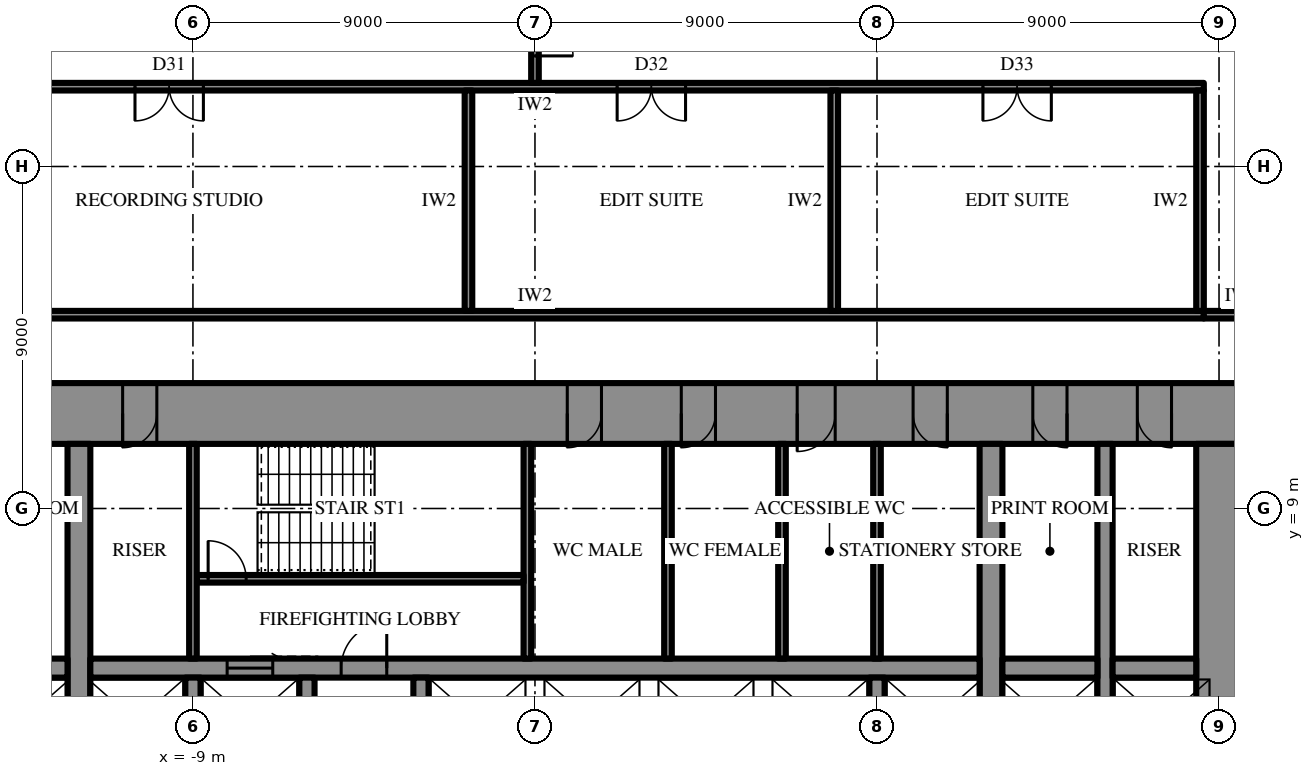
"""IFC4 building model, lengths in metres.
Left out: names, types, materials, properties, quantities, classifications, styles, units other than length and angle.
Written with IfcOpenShell. Run it as: python <this file> out.ifc"""

import sys

from ifc_helpers import new_model, si_unit, direction, frame, frame_2d, origin, place, context, subcontext, project, spatial, rectangle, extrude, element, fill, save


model = new_model("IFC4")
c1 = context("Model", 3, precision=1e-05, world=origin(), true_north=direction((0.0, 1.0)))
c2 = subcontext(c1, "Body", "Model", "MODEL_VIEW")
j1 = project(units=[si_unit("LENGTHUNIT", "METRE"), si_unit("PLANEANGLEUNIT", "RADIAN")], contexts=[c1])
p1 = place(None, origin())
s1 = spatial("IfcSite", under=j1, at=p1, CompositionType="ELEMENT")
p2 = place(p1, origin())
s2 = spatial("IfcBuilding", under=s1, at=p2, CompositionType="ELEMENT")
p3 = place(p2, frame((0.0, 0.0, 99.1)))
s3 = spatial("IfcBuildingStorey", under=s2, at=p3, CompositionType="ELEMENT", Elevation=99.1)
p4 = place(p3, frame((-18.6, 11.5, 0.0), z_axis=(0.0, 0.0, 1.0), x_axis=(1.0, 0.0, 0.0)))
e1 = element("IfcWall", 1, at=p4, inside=s3, PredefinedType="SHEAR", context=c2, shape_type="SweptSolid", body=[
    extrude(rectangle(XDim=37.2, YDim=1.6, at=frame_2d((18.6, 0.0))), origin(), (0.0, 0.0, 1.0), 4.2),
])
p5 = place(p4, frame((19.45, 0.0, 0.0)))
e2 = element("IfcOpeningElement", 2, at=p5, cuts=e1, PredefinedType="OPENING", context=c2, shape_type="SweptSolid", body=[
    extrude(rectangle(XDim=0.9, YDim=2.2, at=frame_2d((0.45, 1.1))), frame((0.0, 0.81, 0.0), z_axis=(0.0, -1.0, 0.0), x_axis=(1.0, 0.0, 0.0)), (0.0, 0.0, 1.0), 1.62),
])
p6 = place(p4, frame((22.45, 0.0, 0.0)))
e3 = element("IfcOpeningElement", 3, at=p6, cuts=e1, PredefinedType="OPENING", context=c2, shape_type="SweptSolid", body=[
    extrude(rectangle(XDim=0.9, YDim=2.2, at=frame_2d((0.45, 1.1))), frame((0.0, 0.81, 0.0), z_axis=(0.0, -1.0, 0.0), x_axis=(1.0, 0.0, 0.0)), (0.0, 0.0, 1.0), 1.62),
])
p7 = place(p4, frame((25.5, 0.0, 0.0)))
e4 = element("IfcOpeningElement", 4, at=p7, cuts=e1, PredefinedType="OPENING", context=c2, shape_type="SweptSolid", body=[
    extrude(rectangle(XDim=1.0, YDim=2.2, at=frame_2d((0.5, 1.1))), frame((0.0, 0.81, 0.0), z_axis=(0.0, -1.0, 0.0), x_axis=(1.0, 0.0, 0.0)), (0.0, 0.0, 1.0), 1.62),
])
p8 = place(p4, frame((1.85, 0.0, 0.0)))
e5 = element("IfcOpeningElement", 5, at=p8, cuts=e1, PredefinedType="OPENING", context=c2, shape_type="SweptSolid", body=[
    extrude(rectangle(XDim=0.9, YDim=2.2, at=frame_2d((0.45, 1.1))), frame((0.0, 0.81, 0.0), z_axis=(0.0, -1.0, 0.0), x_axis=(1.0, 0.0, 0.0)), (0.0, 0.0, 1.0), 1.62),
])
p9 = place(p4, frame((4.6, 0.0, 0.0)))
e6 = element("IfcOpeningElement", 6, at=p9, cuts=e1, PredefinedType="OPENING", context=c2, shape_type="SweptSolid", body=[
    extrude(rectangle(XDim=0.9, YDim=2.2, at=frame_2d((0.45, 1.1))), frame((0.0, 0.81, 0.0), z_axis=(0.0, -1.0, 0.0), x_axis=(1.0, 0.0, 0.0)), (0.0, 0.0, 1.0), 1.62),
])
p10 = place(p4, frame((7.75, 0.0, 0.0)))
e7 = element("IfcOpeningElement", 7, at=p10, cuts=e1, PredefinedType="OPENING", context=c2, shape_type="SweptSolid", body=[
    extrude(rectangle(XDim=0.9, YDim=2.2, at=frame_2d((0.45, 1.1))), frame((0.0, 0.81, 0.0), z_axis=(0.0, -1.0, 0.0), x_axis=(1.0, 0.0, 0.0)), (0.0, 0.0, 1.0), 1.62),
])
p11 = place(p4, frame((28.55, 0.0, 0.0)))
e8 = element("IfcOpeningElement", 8, at=p11, cuts=e1, PredefinedType="OPENING", context=c2, shape_type="SweptSolid", body=[
    extrude(rectangle(XDim=0.9, YDim=2.2, at=frame_2d((0.45, 1.1))), frame((0.0, 0.81, 0.0), z_axis=(0.0, -1.0, 0.0), x_axis=(1.0, 0.0, 0.0)), (0.0, 0.0, 1.0), 1.62),
])
p12 = place(p4, frame((31.7, 0.0, 0.0)))
e9 = element("IfcOpeningElement", 9, at=p12, cuts=e1, PredefinedType="OPENING", context=c2, shape_type="SweptSolid", body=[
    extrude(rectangle(XDim=0.9, YDim=2.2, at=frame_2d((0.45, 1.1))), frame((0.0, 0.81, 0.0), z_axis=(0.0, -1.0, 0.0), x_axis=(1.0, 0.0, 0.0)), (0.0, 0.0, 1.0), 1.62),
])
p13 = place(p4, frame((34.45, 0.0, 0.0)))
e10 = element("IfcOpeningElement", 10, at=p13, cuts=e1, PredefinedType="OPENING", context=c2, shape_type="SweptSolid", body=[
    extrude(rectangle(XDim=0.9, YDim=2.2, at=frame_2d((0.45, 1.1))), frame((0.0, 0.81, 0.0), z_axis=(0.0, -1.0, 0.0), x_axis=(1.0, 0.0, 0.0)), (0.0, 0.0, 1.0), 1.62),
])
p14 = place(p3, frame((18.0, -10.7, 0.0), z_axis=(0.0, 0.0, 1.0), x_axis=(0.0, 1.0, 0.0)))
e11 = element("IfcWall", 11, at=p14, inside=s3, PredefinedType="SHEAR", context=c2, shape_type="SweptSolid", body=[
    extrude(rectangle(XDim=21.4, YDim=1.2, at=frame_2d((10.7, 0.0))), origin(), (0.0, 0.0, 1.0), 4.2),
])
p15 = place(p14, frame((9.8, 0.0, 0.0)))
e12 = element("IfcOpeningElement", 12, at=p15, cuts=e11, PredefinedType="OPENING", context=c2, shape_type="SweptSolid", body=[
    extrude(rectangle(XDim=1.8, YDim=2.4, at=frame_2d((0.9, 1.2))), frame((0.0, 0.61, 0.0), z_axis=(0.0, -1.0, 0.0), x_axis=(1.0, 0.0, 0.0)), (0.0, 0.0, 1.0), 1.22),
])
p16 = place(p3, frame((12.0, -10.7, 0.0), z_axis=(0.0, 0.0, 1.0), x_axis=(0.0, 1.0, 0.0)))
e13 = element("IfcWall", 13, at=p16, inside=s3, PredefinedType="SHEAR", context=c2, shape_type="SweptSolid", body=[
    extrude(rectangle(XDim=21.4, YDim=0.6, at=frame_2d((10.7, 0.0))), origin(), (0.0, 0.0, 1.0), 4.2),
])
p17 = place(p16, frame((9.8, 0.0, 0.0)))
e14 = element("IfcOpeningElement", 14, at=p17, cuts=e13, PredefinedType="OPENING", context=c2, shape_type="SweptSolid", body=[
    extrude(rectangle(XDim=1.8, YDim=2.4, at=frame_2d((0.9, 1.2))), frame((0.0, 0.31, 0.0), z_axis=(0.0, -1.0, 0.0), x_axis=(1.0, 0.0, 0.0)), (0.0, 0.0, 1.0), 0.62),
])
p18 = place(p3, frame((-12.0, -10.7, 0.0), z_axis=(0.0, 0.0, 1.0), x_axis=(0.0, 1.0, 0.0)))
e15 = element("IfcWall", 15, at=p18, inside=s3, PredefinedType="SHEAR", context=c2, shape_type="SweptSolid", body=[
    extrude(rectangle(XDim=21.4, YDim=0.6, at=frame_2d((10.7, 0.0))), origin(), (0.0, 0.0, 1.0), 4.2),
])
p19 = place(p18, frame((9.8, 0.0, 0.0)))
e16 = element("IfcOpeningElement", 16, at=p19, cuts=e15, PredefinedType="OPENING", context=c2, shape_type="SweptSolid", body=[
    extrude(rectangle(XDim=1.8, YDim=2.4, at=frame_2d((0.9, 1.2))), frame((0.0, 0.31, 0.0), z_axis=(0.0, -1.0, 0.0), x_axis=(1.0, 0.0, 0.0)), (0.0, 0.0, 1.0), 0.62),
])
p20 = place(p3, frame((15.0, -10.7, 0.0), z_axis=(0.0, 0.0, 1.0), x_axis=(0.0, 1.0, 0.0)))
e17 = element("IfcWall", 17, at=p20, inside=s3, PredefinedType="SHEAR", context=c2, shape_type="SweptSolid", body=[
    extrude(rectangle(XDim=21.4, YDim=0.4, at=frame_2d((10.7, 0.0))), origin(), (0.0, 0.0, 1.0), 4.2),
])
p21 = place(p20, frame((9.8, 0.0, 0.0)))
e18 = element("IfcOpeningElement", 18, at=p21, cuts=e17, PredefinedType="OPENING", context=c2, shape_type="SweptSolid", body=[
    extrude(rectangle(XDim=1.8, YDim=2.4, at=frame_2d((0.9, 1.2))), frame((0.0, 0.21, 0.0), z_axis=(0.0, -1.0, 0.0), x_axis=(1.0, 0.0, 0.0)), (0.0, 0.0, 1.0), 0.42),
])
p22 = place(p3, frame((-14.8, 4.8, 0.0), z_axis=(0.0, 0.0, 1.0), x_axis=(1.0, 0.0, 0.0)))
e19 = element("IfcWall", 19, at=p22, inside=s3, PredefinedType="SHEAR", context=c2, shape_type="SweptSolid", body=[
    extrude(rectangle(XDim=2.5, YDim=0.5, at=frame_2d((1.25, 0.0))), origin(), (0.0, 0.0, 1.0), 4.2),
])
p23 = place(p3, frame((-11.7, 4.8, 0.0), z_axis=(0.0, 0.0, 1.0), x_axis=(1.0, 0.0, 0.0)))
e20 = element("IfcWall", 20, at=p23, inside=s3, PredefinedType="SHEAR", context=c2, shape_type="SweptSolid", body=[
    extrude(rectangle(XDim=23.4, YDim=0.5, at=frame_2d((11.7, 0.0))), origin(), (0.0, 0.0, 1.0), 4.2),
])
p24 = place(p23, frame((6.6, 0.0, 0.0)))
e21 = element("IfcOpeningElement", 21, at=p24, cuts=e20, PredefinedType="OPENING", context=c2, shape_type="SweptSolid", body=[
    extrude(rectangle(XDim=1.2, YDim=2.2, at=frame_2d((0.6, 1.1))), frame((0.0, 0.26, 0.0), z_axis=(0.0, -1.0, 0.0), x_axis=(1.0, 0.0, 0.0)), (0.0, 0.0, 1.0), 0.52),
])
p25 = place(p23, frame((3.6, 0.0, 0.0)))
e22 = element("IfcOpeningElement", 22, at=p25, cuts=e20, PredefinedType="OPENING", context=c2, shape_type="SweptSolid", body=[
    extrude(rectangle(XDim=1.2, YDim=2.2, at=frame_2d((0.6, 1.1))), frame((0.0, 0.26, 0.0), z_axis=(0.0, -1.0, 0.0), x_axis=(1.0, 0.0, 0.0)), (0.0, 0.0, 1.0), 0.52),
])
p26 = place(p3, frame((12.3, 4.8, 0.0), z_axis=(0.0, 0.0, 1.0), x_axis=(1.0, 0.0, 0.0)))
e23 = element("IfcWall", 23, at=p26, inside=s3, PredefinedType="SHEAR", context=c2, shape_type="SweptSolid", body=[
    extrude(rectangle(XDim=2.5, YDim=0.5, at=frame_2d((1.25, 0.0))), origin(), (0.0, 0.0, 1.0), 4.2),
])
p27 = place(p3, frame((15.2, 4.8, 0.0), z_axis=(0.0, 0.0, 1.0), x_axis=(1.0, 0.0, 0.0)))
e24 = element("IfcWall", 24, at=p27, inside=s3, PredefinedType="SHEAR", context=c2, shape_type="SweptSolid", body=[
    extrude(rectangle(XDim=2.2, YDim=0.5, at=frame_2d((1.1, 0.0))), origin(), (0.0, 0.0, 1.0), 4.2),
])
for number, where, z_axis, x_axis in (
    (25, (-9.0, 2.25, 0.0), (0.0, 0.0, 1.0), (0.0, 1.0, 0.0)),
    (26, (-6.0, 2.25, 0.0), (0.0, 0.0, 1.0), (0.0, 1.0, 0.0)),
    (27, (-3.0, 2.25, 0.0), (0.0, 0.0, 1.0), (0.0, 1.0, 0.0)),
    (28, (9.0, 2.25, 0.0), (0.0, 0.0, 1.0), (0.0, 1.0, 0.0)),
):
    element("IfcWall", number, at=place(p3, frame(where, z_axis=z_axis, x_axis=x_axis)), inside=s3, PredefinedType="SHEAR", context=c2, shape_type="SweptSolid", body=[
        extrude(rectangle(XDim=2.3, YDim=0.4, at=frame_2d((1.15, 0.0))), origin(), (0.0, 0.0, 1.0), 4.2),
    ])
p28 = place(p3, frame((-0.2, 5.05, 0.0), z_axis=(0.0, 0.0, 1.0), x_axis=(0.0, 1.0, 0.0)))
e29 = element("IfcWall", 29, at=p28, inside=s3, PredefinedType="SHEAR", context=c2, shape_type="SweptSolid", body=[
    extrude(rectangle(XDim=5.65, YDim=0.2, at=frame_2d((2.825, 0.0))), origin(), (0.0, 0.0, 1.0), 4.2),
])
p29 = place(p3, frame((-8.9, 7.15, 0.0), z_axis=(0.0, 0.0, 1.0), x_axis=(1.0, 0.0, 0.0)))
e30 = element("IfcWall", 30, at=p29, inside=s3, PredefinedType="SHEAR", context=c2, shape_type="SweptSolid", body=[
    extrude(rectangle(XDim=8.6, YDim=0.2, at=frame_2d((4.3, 0.0))), origin(), (0.0, 0.0, 1.0), 4.2),
])
p30 = place(p29, frame((0.3, 0.0, 0.0)))
e31 = element("IfcOpeningElement", 31, at=p30, cuts=e30, PredefinedType="OPENING", context=c2, shape_type="SweptSolid", body=[
    extrude(rectangle(XDim=1.0, YDim=2.2, at=frame_2d((0.5, 1.1))), frame((0.0, 0.11, 0.0), z_axis=(0.0, -1.0, 0.0), x_axis=(1.0, 0.0, 0.0)), (0.0, 0.0, 1.0), 0.22),
])
for number, where, z_axis, x_axis in (
    (32, (-9.0, 5.05, 0.0), (0.0, 0.0, 1.0), (0.0, 1.0, 0.0)),
    (33, (9.0, 5.05, 0.0), (0.0, 0.0, 1.0), (0.0, 1.0, 0.0)),
    (34, (3.5, 5.05, 0.0), (0.0, 0.0, 1.0), (0.0, 1.0, 0.0)),
    (35, (6.5, 5.05, 0.0), (0.0, 0.0, 1.0), (0.0, 1.0, 0.0)),
):
    element("IfcWall", number, at=place(p3, frame(where, z_axis=z_axis, x_axis=x_axis)), inside=s3, PredefinedType="PARTITIONING", context=c2, shape_type="SweptSolid", body=[
        extrude(rectangle(XDim=5.65, YDim=0.2, at=frame_2d((2.825, 0.0))), origin(), (0.0, 0.0, 1.0), 4.0),
    ])
p31 = place(p3, frame((-17.6, 14.1, 0.0), z_axis=(0.0, 0.0, 1.0), x_axis=(1.0, 0.0, 0.0)))
e36 = element("IfcWall", 36, at=p31, inside=s3, PredefinedType="PARTITIONING", context=c2, shape_type="SweptSolid", body=[
    extrude(rectangle(XDim=35.2, YDim=0.2, at=frame_2d((17.6, 0.0))), origin(), (0.0, 0.0, 1.0), 4.0),
])
p32 = place(p3, frame((-17.6, 20.1, 0.0), z_axis=(0.0, 0.0, 1.0), x_axis=(1.0, 0.0, 0.0)))
e37 = element("IfcWall", 37, at=p32, inside=s3, PredefinedType="PARTITIONING", context=c2, shape_type="SweptSolid", body=[
    extrude(rectangle(XDim=35.2, YDim=0.2, at=frame_2d((17.6, 0.0))), origin(), (0.0, 0.0, 1.0), 4.0),
])
p33 = place(p32, frame((7.075, 0.0, 0.0)))
e38 = element("IfcOpeningElement", 38, at=p33, cuts=e37, PredefinedType="OPENING", context=c2, shape_type="SweptSolid", body=[
    extrude(rectangle(XDim=1.8, YDim=2.4, at=frame_2d((0.9, 1.2))), frame((0.0, 0.11, 0.0), z_axis=(0.0, -1.0, 0.0), x_axis=(1.0, 0.0, 0.0)), (0.0, 0.0, 1.0), 0.22),
])
p34 = place(p32, frame((19.762, 0.0, 0.0)))
e39 = element("IfcOpeningElement", 39, at=p34, cuts=e37, PredefinedType="OPENING", context=c2, shape_type="SweptSolid", body=[
    extrude(rectangle(XDim=1.8, YDim=2.4, at=frame_2d((0.9, 1.2))), frame((0.0, 0.11, 0.0), z_axis=(0.0, -1.0, 0.0), x_axis=(1.0, 0.0, 0.0)), (0.0, 0.0, 1.0), 0.22),
])
p35 = place(p32, frame((29.387, 0.0, 0.0)))
e40 = element("IfcOpeningElement", 40, at=p35, cuts=e37, PredefinedType="OPENING", context=c2, shape_type="SweptSolid", body=[
    extrude(rectangle(XDim=1.8, YDim=2.4, at=frame_2d((0.9, 1.2))), frame((0.0, 0.11, 0.0), z_axis=(0.0, -1.0, 0.0), x_axis=(1.0, 0.0, 0.0)), (0.0, 0.0, 1.0), 0.22),
])
for number, where, z_axis, x_axis in (
    (41, (-1.75, 14.2, 0.0), (0.0, 0.0, 1.0), (0.0, 1.0, 0.0)),
    (42, (7.875, 14.2, 0.0), (0.0, 0.0, 1.0), (0.0, 1.0, 0.0)),
    (43, (17.5, 14.2, 0.0), (0.0, 0.0, 1.0), (0.0, 1.0, 0.0)),
):
    element("IfcWall", number, at=place(p3, frame(where, z_axis=z_axis, x_axis=x_axis)), inside=s3, PredefinedType="PARTITIONING", context=c2, shape_type="SweptSolid", body=[
        extrude(rectangle(XDim=5.8, YDim=0.2, at=frame_2d((2.9, 0.0))), origin(), (0.0, 0.0, 1.0), 4.0),
    ])
p36 = place(p3, frame((17.6, 14.1, 0.0), z_axis=(0.0, 0.0, 1.0), x_axis=(1.0, 0.0, 0.0)))
e44 = element("IfcWall", 44, at=p36, inside=s3, PredefinedType="PARTITIONING", context=c2, shape_type="SweptSolid", body=[
    extrude(rectangle(XDim=2.0, YDim=0.2, at=frame_2d((1.0, 0.0))), origin(), (0.0, 0.0, 1.0), 4.0),
])
p37 = place(p3, frame((0.0, 20.2, 0.0), z_axis=(0.0, 0.0, 1.0), x_axis=(0.0, 1.0, 0.0)))
e45 = element("IfcWall", 45, at=p37, inside=s3, PredefinedType="PARTITIONING", context=c2, shape_type="SweptSolid", body=[
    extrude(rectangle(XDim=12.1, YDim=0.2, at=frame_2d((6.05, 0.0))), origin(), (0.0, 0.0, 1.0), 2.944),
])
p38 = place(p37, frame((0.71, 0.0, 0.0)))
e46 = element("IfcOpeningElement", 46, at=p38, cuts=e45, PredefinedType="OPENING", context=c2, shape_type="SweptSolid", body=[
    extrude(rectangle(XDim=1.0, YDim=2.2, at=frame_2d((0.5, 1.1))), frame((0.0, 0.11, 0.0), z_axis=(0.0, -1.0, 0.0), x_axis=(1.0, 0.0, 0.0)), (0.0, 0.0, 1.0), 0.22),
])
p39 = place(p24, origin())
e47 = element("IfcDoor", 47, at=p39, inside=s3, OperationType="SINGLE_SWING_LEFT", PredefinedType="DOOR", context=c2, shape_type="SweptSolid", body=[
    extrude(rectangle(XDim=1.2, YDim=2.2, at=frame_2d((0.6, 1.1))), frame((0.0, 0.025, 0.0), z_axis=(0.0, -1.0, 0.0), x_axis=(1.0, 0.0, 0.0)), (0.0, 0.0, 1.0), 0.05),
])
fill(e21, e47)
p40 = place(p30, origin())
e48 = element("IfcDoor", 48, at=p40, inside=s3, OperationType="SINGLE_SWING_RIGHT", PredefinedType="DOOR", context=c2, shape_type="SweptSolid", body=[
    extrude(rectangle(XDim=1.0, YDim=2.2, at=frame_2d((0.5, 1.1))), frame((0.0, 0.025, 0.0), z_axis=(0.0, -1.0, 0.0), x_axis=(1.0, 0.0, 0.0)), (0.0, 0.0, 1.0), 0.05),
])
fill(e31, e48)
p41 = place(p5, frame((0.9, 0.0, 0.0), z_axis=(0.0, 0.0, 1.0), x_axis=(-1.0, 0.0, 0.0)))
e49 = element("IfcDoor", 49, at=p41, inside=s3, OperationType="SINGLE_SWING_LEFT", PredefinedType="DOOR", context=c2, shape_type="SweptSolid", body=[
    extrude(rectangle(XDim=0.9, YDim=2.2, at=frame_2d((0.45, 1.1))), frame((0.0, 0.025, 0.0), z_axis=(0.0, -1.0, 0.0), x_axis=(1.0, 0.0, 0.0)), (0.0, 0.0, 1.0), 0.05),
])
fill(e2, e49)
p42 = place(p6, frame((0.9, 0.0, 0.0), z_axis=(0.0, 0.0, 1.0), x_axis=(-1.0, 0.0, 0.0)))
e50 = element("IfcDoor", 50, at=p42, inside=s3, OperationType="SINGLE_SWING_LEFT", PredefinedType="DOOR", context=c2, shape_type="SweptSolid", body=[
    extrude(rectangle(XDim=0.9, YDim=2.2, at=frame_2d((0.45, 1.1))), frame((0.0, 0.025, 0.0), z_axis=(0.0, -1.0, 0.0), x_axis=(1.0, 0.0, 0.0)), (0.0, 0.0, 1.0), 0.05),
])
fill(e3, e50)
p43 = place(p7, frame((1.0, 0.0, 0.0), z_axis=(0.0, 0.0, 1.0), x_axis=(-1.0, 0.0, 0.0)))
e51 = element("IfcDoor", 51, at=p43, inside=s3, OperationType="SINGLE_SWING_LEFT", PredefinedType="DOOR", context=c2, shape_type="SweptSolid", body=[
    extrude(rectangle(XDim=1.0, YDim=2.2, at=frame_2d((0.5, 1.1))), frame((0.0, 0.025, 0.0), z_axis=(0.0, -1.0, 0.0), x_axis=(1.0, 0.0, 0.0)), (0.0, 0.0, 1.0), 0.05),
])
fill(e4, e51)
p44 = place(p10, frame((0.9, 0.0, 0.0), z_axis=(0.0, 0.0, 1.0), x_axis=(-1.0, 0.0, 0.0)))
e52 = element("IfcDoor", 52, at=p44, inside=s3, OperationType="SINGLE_SWING_LEFT", PredefinedType="DOOR", context=c2, shape_type="SweptSolid", body=[
    extrude(rectangle(XDim=0.9, YDim=2.2, at=frame_2d((0.45, 1.1))), frame((0.0, 0.025, 0.0), z_axis=(0.0, -1.0, 0.0), x_axis=(1.0, 0.0, 0.0)), (0.0, 0.0, 1.0), 0.05),
])
fill(e7, e52)
p45 = place(p11, frame((0.9, 0.0, 0.0), z_axis=(0.0, 0.0, 1.0), x_axis=(-1.0, 0.0, 0.0)))
e53 = element("IfcDoor", 53, at=p45, inside=s3, OperationType="SINGLE_SWING_RIGHT", PredefinedType="DOOR", context=c2, shape_type="SweptSolid", body=[
    extrude(rectangle(XDim=0.9, YDim=2.2, at=frame_2d((0.45, 1.1))), frame((0.0, 0.025, 0.0), z_axis=(0.0, -1.0, 0.0), x_axis=(1.0, 0.0, 0.0)), (0.0, 0.0, 1.0), 0.05),
])
fill(e8, e53)
p46 = place(p12, frame((0.9, 0.0, 0.0), z_axis=(0.0, 0.0, 1.0), x_axis=(-1.0, 0.0, 0.0)))
e54 = element("IfcDoor", 54, at=p46, inside=s3, OperationType="SINGLE_SWING_RIGHT", PredefinedType="DOOR", context=c2, shape_type="SweptSolid", body=[
    extrude(rectangle(XDim=0.9, YDim=2.2, at=frame_2d((0.45, 1.1))), frame((0.0, 0.025, 0.0), z_axis=(0.0, -1.0, 0.0), x_axis=(1.0, 0.0, 0.0)), (0.0, 0.0, 1.0), 0.05),
])
fill(e9, e54)
p47 = place(p13, frame((0.9, 0.0, 0.0), z_axis=(0.0, 0.0, 1.0), x_axis=(-1.0, 0.0, 0.0)))
e55 = element("IfcDoor", 55, at=p47, inside=s3, OperationType="SINGLE_SWING_RIGHT", PredefinedType="DOOR", context=c2, shape_type="SweptSolid", body=[
    extrude(rectangle(XDim=0.9, YDim=2.2, at=frame_2d((0.45, 1.1))), frame((0.0, 0.025, 0.0), z_axis=(0.0, -1.0, 0.0), x_axis=(1.0, 0.0, 0.0)), (0.0, 0.0, 1.0), 0.05),
])
fill(e10, e55)
p48 = place(p25, origin())
e56 = element("IfcDoor", 56, at=p48, inside=s3, OperationType="SLIDING_TO_LEFT", PredefinedType="DOOR", context=c2, shape_type="SweptSolid", body=[
    extrude(rectangle(XDim=1.2, YDim=2.2, at=frame_2d((0.6, 1.1))), frame((0.0, 0.025, 0.0), z_axis=(0.0, -1.0, 0.0), x_axis=(1.0, 0.0, 0.0)), (0.0, 0.0, 1.0), 0.05),
])
fill(e22, e56)
p49 = place(p33, frame((1.8, 0.0, 0.0), z_axis=(0.0, 0.0, 1.0), x_axis=(-1.0, 0.0, 0.0)))
e57 = element("IfcDoor", 57, at=p49, inside=s3, OperationType="DOUBLE_DOOR_SINGLE_SWING", PredefinedType="DOOR", context=c2, shape_type="SweptSolid", body=[
    extrude(rectangle(XDim=1.8, YDim=2.4, at=frame_2d((0.9, 1.2))), frame((0.0, 0.025, 0.0), z_axis=(0.0, -1.0, 0.0), x_axis=(1.0, 0.0, 0.0)), (0.0, 0.0, 1.0), 0.05),
])
fill(e38, e57)
p50 = place(p34, frame((1.8, 0.0, 0.0), z_axis=(0.0, 0.0, 1.0), x_axis=(-1.0, 0.0, 0.0)))
e58 = element("IfcDoor", 58, at=p50, inside=s3, OperationType="DOUBLE_DOOR_SINGLE_SWING", PredefinedType="DOOR", context=c2, shape_type="SweptSolid", body=[
    extrude(rectangle(XDim=1.8, YDim=2.4, at=frame_2d((0.9, 1.2))), frame((0.0, 0.025, 0.0), z_axis=(0.0, -1.0, 0.0), x_axis=(1.0, 0.0, 0.0)), (0.0, 0.0, 1.0), 0.05),
])
fill(e39, e58)
p51 = place(p35, frame((1.8, 0.0, 0.0), z_axis=(0.0, 0.0, 1.0), x_axis=(-1.0, 0.0, 0.0)))
e59 = element("IfcDoor", 59, at=p51, inside=s3, OperationType="DOUBLE_DOOR_SINGLE_SWING", PredefinedType="DOOR", context=c2, shape_type="SweptSolid", body=[
    extrude(rectangle(XDim=1.8, YDim=2.4, at=frame_2d((0.9, 1.2))), frame((0.0, 0.025, 0.0), z_axis=(0.0, -1.0, 0.0), x_axis=(1.0, 0.0, 0.0)), (0.0, 0.0, 1.0), 0.05),
])
fill(e40, e59)
p52 = place(p38, frame((1.0, 0.0, 0.0), z_axis=(0.0, 0.0, 1.0), x_axis=(-1.0, 0.0, 0.0)))
e60 = element("IfcDoor", 60, at=p52, inside=s3, OperationType="SINGLE_SWING_LEFT", PredefinedType="DOOR", context=c2, shape_type="SweptSolid", body=[
    extrude(rectangle(XDim=1.0, YDim=2.2, at=frame_2d((0.5, 1.1))), frame((0.0, 0.025, 0.0), z_axis=(0.0, -1.0, 0.0), x_axis=(1.0, 0.0, 0.0)), (0.0, 0.0, 1.0), 0.05),
])
fill(e46, e60)
save(model, sys.argv[1])
